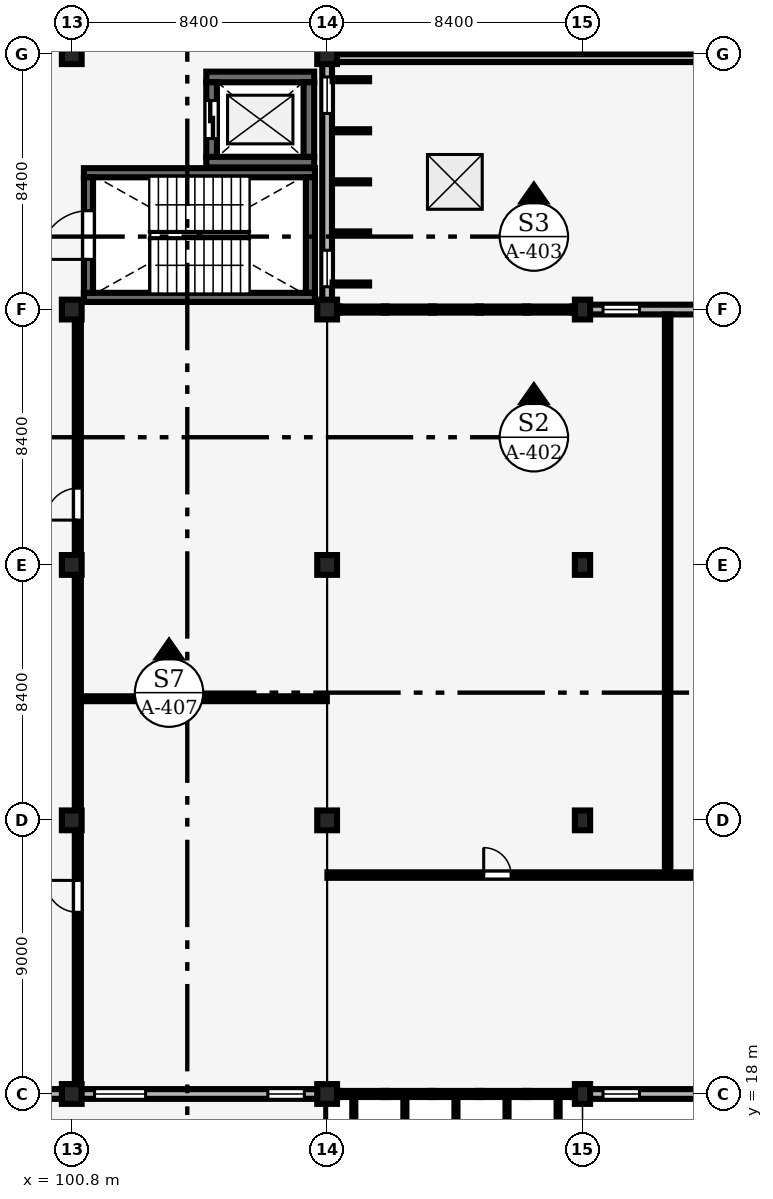
"""IFC4 building model, lengths in metres.
Left out: names, types, materials, properties, quantities, classifications, styles, units other than length and angle.
Written with IfcOpenShell. Run it as: python <this file> out.ifc"""

import sys

from ifc_helpers import new_model, si_unit, direction, frame, frame_2d, origin, origin_2d, place, context, subcontext, project, spatial, rectangle, extrude, element, fill, save


model = new_model("IFC4")
c1 = context("Model", 3, precision=1e-05, world=origin(), true_north=direction((0.0, 1.0)))
c2 = subcontext(c1, "Body", "Model", "MODEL_VIEW")
j1 = project(units=[si_unit("LENGTHUNIT", "METRE"), si_unit("PLANEANGLEUNIT", "RADIAN")], contexts=[c1])
p1 = place(None, origin())
s1 = spatial("IfcSite", under=j1, at=p1, CompositionType="ELEMENT")
p2 = place(p1, origin())
s2 = spatial("IfcBuilding", under=s1, at=p2, CompositionType="ELEMENT")
p3 = place(p2, frame((0.0, 0.0, 4.8)))
s3 = spatial("IfcBuildingStorey", under=s2, at=p3, CompositionType="ELEMENT", Elevation=4.8)
for number, where, z_axis, x_axis in (
    (1, (100.8, 18.0, 0.0), (0.0, 0.0, 1.0), (1.0, 0.0, 0.0)),
    (2, (100.8, 27.0, 0.0), (0.0, 0.0, 1.0), (1.0, 0.0, 0.0)),
    (3, (100.8, 35.4, 0.0), (0.0, 0.0, 1.0), (1.0, 0.0, 0.0)),
    (4, (100.8, 43.8, 0.0), (0.0, 0.0, 1.0), (1.0, 0.0, 0.0)),
    (5, (100.8, 52.2, 0.0), (0.0, 0.0, 1.0), (1.0, 0.0, 0.0)),
    (6, (109.2, 18.0, 0.0), (0.0, 0.0, 1.0), (1.0, 0.0, 0.0)),
    (7, (109.2, 27.0, 0.0), (0.0, 0.0, 1.0), (1.0, 0.0, 0.0)),
    (8, (109.2, 35.4, 0.0), (0.0, 0.0, 1.0), (1.0, 0.0, 0.0)),
    (9, (109.2, 43.8, 0.0), (0.0, 0.0, 1.0), (1.0, 0.0, 0.0)),
    (10, (109.2, 52.2, 0.0), (0.0, 0.0, 1.0), (1.0, 0.0, 0.0)),
):
    element("IfcColumn", number, at=place(p3, frame(where, z_axis=z_axis, x_axis=x_axis)), inside=s3, PredefinedType="COLUMN", context=c2, shape_type="SweptSolid", body=[
        extrude(rectangle(XDim=0.65, YDim=0.65, at=origin_2d()), origin(), (0.0, 0.0, 1.0), 4.2),
    ])
for number, where, z_axis, x_axis in (
    (11, (117.6, 18.0, 0.0), (0.0, 0.0, 1.0), (1.0, 0.0, 0.0)),
    (12, (117.6, 27.0, 0.0), (0.0, 0.0, 1.0), (1.0, 0.0, 0.0)),
    (13, (117.6, 35.4, 0.0), (0.0, 0.0, 1.0), (1.0, 0.0, 0.0)),
    (14, (117.6, 43.8, 0.0), (0.0, 0.0, 1.0), (1.0, 0.0, 0.0)),
):
    element("IfcColumn", number, at=place(p3, frame(where, z_axis=z_axis, x_axis=x_axis)), inside=s3, PredefinedType="COLUMN", context=c2, shape_type="SweptSolid", body=[
        extrude(rectangle(XDim=0.5, YDim=0.65, at=origin_2d()), origin(), (0.0, 0.0, 1.0), 4.2),
    ])
p4 = place(p3, frame((92.7, 18.0, 0.0), z_axis=(0.0, 0.0, 1.0), x_axis=(1.0, 0.0, 0.0)))
e15 = element("IfcWall", 15, at=p4, inside=s3, PredefinedType="SOLIDWALL", context=c2, shape_type="SweptSolid", body=[
    extrude(rectangle(XDim=7.8, YDim=0.32, at=frame_2d((3.9, 0.0))), origin(), (0.0, 0.0, 1.0), 3.15),
])
p5 = place(p4, frame((4.8, 0.0, 0.0), z_axis=(0.0, 0.0, 1.0), x_axis=(-1.0, 0.0, 0.0)))
e16 = element("IfcOpeningElement", 16, at=p5, cuts=e15, PredefinedType="OPENING", context=c2, shape_type="SweptSolid", body=[
    extrude(rectangle(XDim=1.8, YDim=2.3, at=frame_2d((0.9, 1.15))), frame((0.0, 0.17, 0.0), z_axis=(0.0, -1.0, 0.0), x_axis=(1.0, 0.0, 0.0)), (0.0, 0.0, 1.0), 0.34),
])
p6 = place(p4, frame((0.45, 0.0, 0.95)))
e17 = element("IfcOpeningElement", 17, at=p6, cuts=e15, PredefinedType="OPENING", context=c2, shape_type="SweptSolid", body=[
    extrude(rectangle(XDim=1.68, YDim=1.8, at=frame_2d((0.84, 0.9))), frame((0.0, 0.17, 0.0), z_axis=(0.0, -1.0, 0.0), x_axis=(1.0, 0.0, 0.0)), (0.0, 0.0, 1.0), 0.34),
])
p7 = place(p3, frame((101.1, 18.0, 0.0), z_axis=(0.0, 0.0, 1.0), x_axis=(1.0, 0.0, 0.0)))
e18 = element("IfcWall", 18, at=p7, inside=s3, PredefinedType="SOLIDWALL", context=c2, shape_type="SweptSolid", body=[
    extrude(rectangle(XDim=7.8, YDim=0.32, at=frame_2d((3.9, 0.0))), origin(), (0.0, 0.0, 1.0), 3.1),
])
p8 = place(p7, frame((0.45, 0.0, 0.9)))
e19 = element("IfcOpeningElement", 19, at=p8, cuts=e18, PredefinedType="OPENING", context=c2, shape_type="SweptSolid", body=[
    extrude(rectangle(XDim=1.68, YDim=2.05, at=frame_2d((0.84, 1.025))), frame((0.0, 0.17, 0.0), z_axis=(0.0, -1.0, 0.0), x_axis=(1.0, 0.0, 0.0)), (0.0, 0.0, 1.0), 0.34),
])
p9 = place(p7, frame((6.15, 0.0, 0.9)))
e20 = element("IfcOpeningElement", 20, at=p9, cuts=e18, PredefinedType="OPENING", context=c2, shape_type="SweptSolid", body=[
    extrude(rectangle(XDim=1.2, YDim=1.5, at=frame_2d((0.6, 0.75))), frame((0.0, 0.17, 0.0), z_axis=(0.0, -1.0, 0.0), x_axis=(1.0, 0.0, 0.0)), (0.0, 0.0, 1.0), 0.34),
])
p10 = place(p3, frame((117.825, 18.0, 0.0), z_axis=(0.0, 0.0, 1.0), x_axis=(1.0, 0.0, 0.0)))
e21 = element("IfcWall", 21, at=p10, inside=s3, PredefinedType="SOLIDWALL", context=c2, shape_type="SweptSolid", body=[
    extrude(rectangle(XDim=7.95, YDim=0.32, at=frame_2d((3.975, 0.0))), origin(), (0.0, 0.0, 1.0), 3.14),
])
p11 = place(p10, frame((0.45, 0.0, 0.9)))
e22 = element("IfcOpeningElement", 22, at=p11, cuts=e21, PredefinedType="OPENING", context=c2, shape_type="SweptSolid", body=[
    extrude(rectangle(XDim=1.2, YDim=1.8, at=frame_2d((0.6, 0.9))), frame((0.0, 0.17, 0.0), z_axis=(0.0, -1.0, 0.0), x_axis=(1.0, 0.0, 0.0)), (0.0, 0.0, 1.0), 0.34),
])
p12 = place(p10, frame((6.02, 0.0, 0.9)))
e23 = element("IfcOpeningElement", 23, at=p12, cuts=e21, PredefinedType="OPENING", context=c2, shape_type="SweptSolid", body=[
    extrude(rectangle(XDim=1.68, YDim=2.09, at=frame_2d((0.84, 1.045))), frame((0.0, 0.17, 0.0), z_axis=(0.0, -1.0, 0.0), x_axis=(1.0, 0.0, 0.0)), (0.0, 0.0, 1.0), 0.34),
])
p13 = place(p3, frame((117.825, 43.8, 0.0), z_axis=(0.0, 0.0, 1.0), x_axis=(1.0, 0.0, 0.0)))
e24 = element("IfcWall", 24, at=p13, inside=s3, PredefinedType="SOLIDWALL", context=c2, shape_type="SweptSolid", body=[
    extrude(rectangle(XDim=7.95, YDim=0.32, at=frame_2d((3.975, 0.0))), origin(), (0.0, 0.0, 1.0), 3.08),
])
p14 = place(p13, frame((0.45, 0.0, 0.9)))
e25 = element("IfcOpeningElement", 25, at=p14, cuts=e24, PredefinedType="OPENING", context=c2, shape_type="SweptSolid", body=[
    extrude(rectangle(XDim=1.2, YDim=1.8, at=frame_2d((0.6, 0.9))), frame((0.0, 0.17, 0.0), z_axis=(0.0, -1.0, 0.0), x_axis=(1.0, 0.0, 0.0)), (0.0, 0.0, 1.0), 0.34),
])
p15 = place(p13, frame((6.02, 0.0, 0.9)))
e26 = element("IfcOpeningElement", 26, at=p15, cuts=e24, PredefinedType="OPENING", context=c2, shape_type="SweptSolid", body=[
    extrude(rectangle(XDim=1.68, YDim=2.03, at=frame_2d((0.84, 1.015))), frame((0.0, 0.17, 0.0), z_axis=(0.0, -1.0, 0.0), x_axis=(1.0, 0.0, 0.0)), (0.0, 0.0, 1.0), 0.34),
])
p16 = place(p3, frame((109.2, 44.1, 0.0), z_axis=(0.0, 0.0, 1.0), x_axis=(0.0, 1.0, 0.0)))
e27 = element("IfcWall", 27, at=p16, inside=s3, PredefinedType="SOLIDWALL", context=c2, shape_type="SweptSolid", body=[
    extrude(rectangle(XDim=7.8, YDim=0.32, at=frame_2d((3.9, 0.0))), origin(), (0.0, 0.0, 1.0), 3.3),
])
p17 = place(p16, frame((0.45, 0.0, 0.85)))
e28 = element("IfcOpeningElement", 28, at=p17, cuts=e27, PredefinedType="OPENING", context=c2, shape_type="SweptSolid", body=[
    extrude(rectangle(XDim=1.2, YDim=1.8, at=frame_2d((0.6, 0.9))), frame((0.0, 0.17, 0.0), z_axis=(0.0, -1.0, 0.0), x_axis=(1.0, 0.0, 0.0)), (0.0, 0.0, 1.0), 0.34),
])
p18 = place(p16, frame((6.15, 0.0, 0.85)))
e29 = element("IfcOpeningElement", 29, at=p18, cuts=e27, PredefinedType="OPENING", context=c2, shape_type="SweptSolid", body=[
    extrude(rectangle(XDim=1.2, YDim=1.8, at=frame_2d((0.6, 0.9))), frame((0.0, 0.17, 0.0), z_axis=(0.0, -1.0, 0.0), x_axis=(1.0, 0.0, 0.0)), (0.0, 0.0, 1.0), 0.34),
])
p19 = place(p3, frame((109.33, 52.07, 0.0), z_axis=(0.0, 0.0, 1.0), x_axis=(1.0, 0.0, 0.0)))
e30 = element("IfcWall", 30, at=p19, inside=s3, PredefinedType="PARAPET", context=c2, shape_type="SweptSolid", body=[
    extrude(rectangle(XDim=33.34, YDim=0.26, at=frame_2d((16.67, 0.0))), origin(), (0.0, 0.0, 1.0), 0.85),
])
for number, where, z_axis, x_axis in (
    (31, (101.2, 44.2, 0.0), (0.0, 0.0, 1.0), (1.0, 0.0, 0.0)),
    (32, (101.2, 48.3, 0.0), (0.0, 0.0, 1.0), (1.0, 0.0, 0.0)),
):
    element("IfcWall", number, at=place(p3, frame(where, z_axis=z_axis, x_axis=x_axis)), inside=s3, PredefinedType="SHEAR", context=c2, shape_type="SweptSolid", body=[
        extrude(rectangle(XDim=7.6, YDim=0.3, at=frame_2d((3.8, 0.0))), origin(), (0.0, 0.0, 1.0), 4.025),
    ])
p20 = place(p3, frame((101.35, 44.35, 0.0), z_axis=(0.0, 0.0, 1.0), x_axis=(0.0, 1.0, 0.0)))
e33 = element("IfcWall", 33, at=p20, inside=s3, PredefinedType="SHEAR", context=c2, shape_type="SweptSolid", body=[
    extrude(rectangle(XDim=3.8, YDim=0.3, at=frame_2d((1.9, 0.0))), origin(), (0.0, 0.0, 1.0), 4.025),
])
p21 = place(p20, frame((1.1, 0.0, 0.0)))
e34 = element("IfcOpeningElement", 34, at=p21, cuts=e33, PredefinedType="OPENING", context=c2, shape_type="SweptSolid", body=[
    extrude(rectangle(XDim=1.6, YDim=2.2, at=frame_2d((0.8, 1.1))), frame((0.0, 0.16, 0.0), z_axis=(0.0, -1.0, 0.0), x_axis=(1.0, 0.0, 0.0)), (0.0, 0.0, 1.0), 0.32),
])
p22 = place(p3, frame((108.65, 44.35, 0.0), z_axis=(0.0, 0.0, 1.0), x_axis=(0.0, 1.0, 0.0)))
e35 = element("IfcWall", 35, at=p22, inside=s3, PredefinedType="SHEAR", context=c2, shape_type="SweptSolid", body=[
    extrude(rectangle(XDim=3.8, YDim=0.3, at=frame_2d((1.9, 0.0))), origin(), (0.0, 0.0, 1.0), 4.025),
])
for number, where, z_axis, x_axis in (
    (36, (105.225, 48.65, 0.0), (0.0, 0.0, 1.0), (1.0, 0.0, 0.0)),
    (37, (105.225, 51.45, 0.0), (0.0, 0.0, 1.0), (1.0, 0.0, 0.0)),
):
    element("IfcWall", number, at=place(p3, frame(where, z_axis=z_axis, x_axis=x_axis)), inside=s3, PredefinedType="SHEAR", context=c2, shape_type="SweptSolid", body=[
        extrude(rectangle(XDim=3.55, YDim=0.35, at=frame_2d((1.775, 0.0))), origin(), (0.0, 0.0, 1.0), 3.92),
    ])
p23 = place(p3, frame((105.4, 48.825, 0.0), z_axis=(0.0, 0.0, 1.0), x_axis=(0.0, 1.0, 0.0)))
e38 = element("IfcWall", 38, at=p23, inside=s3, PredefinedType="SHEAR", context=c2, shape_type="SweptSolid", body=[
    extrude(rectangle(XDim=2.45, YDim=0.35, at=frame_2d((1.225, 0.0))), origin(), (0.0, 0.0, 1.0), 3.92),
])
p24 = place(p23, frame((0.6, 0.0, 0.0)))
e39 = element("IfcOpeningElement", 39, at=p24, cuts=e38, PredefinedType="OPENING", context=c2, shape_type="SweptSolid", body=[
    extrude(rectangle(XDim=1.25, YDim=2.25, at=frame_2d((0.625, 1.125))), frame((0.0, 0.185, 0.0), z_axis=(0.0, -1.0, 0.0), x_axis=(1.0, 0.0, 0.0)), (0.0, 0.0, 1.0), 0.37),
])
p25 = place(p3, frame((108.6, 48.825, 0.0), z_axis=(0.0, 0.0, 1.0), x_axis=(0.0, 1.0, 0.0)))
e40 = element("IfcWall", 40, at=p25, inside=s3, PredefinedType="SHEAR", context=c2, shape_type="SweptSolid", body=[
    extrude(rectangle(XDim=2.45, YDim=0.35, at=frame_2d((1.225, 0.0))), origin(), (0.0, 0.0, 1.0), 3.92),
])
p26 = place(p3, frame((101.105, 31.0, 0.0), z_axis=(0.0, 0.0, 1.0), x_axis=(1.0, 0.0, 0.0)))
e41 = element("IfcWall", 41, at=p26, inside=s3, PredefinedType="PARTITIONING", context=c2, shape_type="SweptSolid", body=[
    extrude(rectangle(XDim=8.085, YDim=0.16, at=frame_2d((4.042, 0.0))), origin(), (0.0, 0.0, 1.0), 3.9),
])
p27 = place(p3, frame((101.0, 18.165, 0.0), z_axis=(0.0, 0.0, 1.0), x_axis=(0.0, 1.0, 0.0)))
e42 = element("IfcWall", 42, at=p27, inside=s3, PredefinedType="PARTITIONING", context=c2, shape_type="SweptSolid", body=[
    extrude(rectangle(XDim=8.5, YDim=0.2, at=frame_2d((4.25, 0.0))), origin(), (0.0, 0.0, 1.0), 3.2),
])
p28 = place(p27, frame((5.81, 0.0, 0.0)))
e43 = element("IfcOpeningElement", 43, at=p28, cuts=e42, PredefinedType="OPENING", context=c2, shape_type="SweptSolid", body=[
    extrude(rectangle(XDim=1.05, YDim=2.2, at=frame_2d((0.525, 1.1))), frame((0.0, 0.11, 0.0), z_axis=(0.0, -1.0, 0.0), x_axis=(1.0, 0.0, 0.0)), (0.0, 0.0, 1.0), 0.22),
])
p29 = place(p3, frame((101.0, 27.335, 0.0), z_axis=(0.0, 0.0, 1.0), x_axis=(0.0, 1.0, 0.0)))
e44 = element("IfcWall", 44, at=p29, inside=s3, PredefinedType="PARTITIONING", context=c2, shape_type="SweptSolid", body=[
    extrude(rectangle(XDim=7.73, YDim=0.2, at=frame_2d((3.865, 0.0))), origin(), (0.0, 0.0, 1.0), 3.15),
])
p30 = place(p3, frame((101.0, 35.735, 0.0), z_axis=(0.0, 0.0, 1.0), x_axis=(0.0, 1.0, 0.0)))
e45 = element("IfcWall", 45, at=p30, inside=s3, PredefinedType="PARTITIONING", context=c2, shape_type="SweptSolid", body=[
    extrude(rectangle(XDim=7.73, YDim=0.2, at=frame_2d((3.865, 0.0))), origin(), (0.0, 0.0, 1.0), 3.1),
])
p31 = place(p30, frame((1.14, 0.0, 0.0)))
e46 = element("IfcOpeningElement", 46, at=p31, cuts=e45, PredefinedType="OPENING", context=c2, shape_type="SweptSolid", body=[
    extrude(rectangle(XDim=1.05, YDim=2.2, at=frame_2d((0.525, 1.1))), frame((0.0, 0.11, 0.0), z_axis=(0.0, -1.0, 0.0), x_axis=(1.0, 0.0, 0.0)), (0.0, 0.0, 1.0), 0.22),
])
p32 = place(p3, frame((120.4, 25.295, 0.0), z_axis=(0.0, 0.0, 1.0), x_axis=(0.0, 1.0, 0.0)))
e47 = element("IfcWall", 47, at=p32, inside=s3, PredefinedType="PARTITIONING", context=c2, shape_type="SweptSolid", body=[
    extrude(rectangle(XDim=18.34, YDim=0.18, at=frame_2d((9.17, 0.0))), origin(), (0.0, 0.0, 1.0), 3.9),
])
p33 = place(p3, frame((109.21, 25.2, 0.0), z_axis=(0.0, 0.0, 1.0), x_axis=(1.0, 0.0, 0.0)))
e48 = element("IfcWall", 48, at=p33, inside=s3, PredefinedType="PARTITIONING", context=c2, shape_type="SweptSolid", body=[
    extrude(rectangle(XDim=33.58, YDim=0.18, at=frame_2d((16.79, 0.0))), origin(), (0.0, 0.0, 1.0), 3.9),
])
p34 = place(p33, frame((5.14, 0.0, 0.0)))
e49 = element("IfcOpeningElement", 49, at=p34, cuts=e48, PredefinedType="OPENING", context=c2, shape_type="SweptSolid", body=[
    extrude(rectangle(XDim=0.9, YDim=2.1, at=frame_2d((0.45, 1.05))), frame((0.0, 0.1, 0.0), z_axis=(0.0, -1.0, 0.0), x_axis=(1.0, 0.0, 0.0)), (0.0, 0.0, 1.0), 0.2),
])
p35 = place(p33, frame((16.34, 0.0, 0.0)))
e50 = element("IfcOpeningElement", 50, at=p35, cuts=e48, PredefinedType="OPENING", context=c2, shape_type="SweptSolid", body=[
    extrude(rectangle(XDim=0.9, YDim=2.1, at=frame_2d((0.45, 1.05))), frame((0.0, 0.1, 0.0), z_axis=(0.0, -1.0, 0.0), x_axis=(1.0, 0.0, 0.0)), (0.0, 0.0, 1.0), 0.2),
])
p36 = place(p33, frame((27.54, 0.0, 0.0)))
e51 = element("IfcOpeningElement", 51, at=p36, cuts=e48, PredefinedType="OPENING", context=c2, shape_type="SweptSolid", body=[
    extrude(rectangle(XDim=0.9, YDim=2.1, at=frame_2d((0.45, 1.05))), frame((0.0, 0.1, 0.0), z_axis=(0.0, -1.0, 0.0), x_axis=(1.0, 0.0, 0.0)), (0.0, 0.0, 1.0), 0.2),
])
p37 = place(p8, origin())
e52 = element("IfcWindow", 52, at=p37, inside=s3, PartitioningType="SINGLE_PANEL", PredefinedType="WINDOW", context=c2, shape_type="SweptSolid", body=[
    extrude(rectangle(XDim=1.68, YDim=2.05, at=frame_2d((0.84, 1.025))), frame((0.0, 0.03, 0.0), z_axis=(0.0, -1.0, 0.0), x_axis=(1.0, 0.0, 0.0)), (0.0, 0.0, 1.0), 0.06),
])
fill(e19, e52)
p38 = place(p9, origin())
e53 = element("IfcWindow", 53, at=p38, inside=s3, PartitioningType="SINGLE_PANEL", PredefinedType="WINDOW", context=c2, shape_type="SweptSolid", body=[
    extrude(rectangle(XDim=1.2, YDim=1.5, at=frame_2d((0.6, 0.75))), frame((0.0, 0.03, 0.0), z_axis=(0.0, -1.0, 0.0), x_axis=(1.0, 0.0, 0.0)), (0.0, 0.0, 1.0), 0.06),
])
fill(e20, e53)
p39 = place(p11, origin())
e54 = element("IfcWindow", 54, at=p39, inside=s3, PartitioningType="SINGLE_PANEL", PredefinedType="WINDOW", context=c2, shape_type="SweptSolid", body=[
    extrude(rectangle(XDim=1.2, YDim=1.8, at=frame_2d((0.6, 0.9))), frame((0.0, 0.03, 0.0), z_axis=(0.0, -1.0, 0.0), x_axis=(1.0, 0.0, 0.0)), (0.0, 0.0, 1.0), 0.06),
])
fill(e22, e54)
p40 = place(p14, origin())
e55 = element("IfcWindow", 55, at=p40, inside=s3, PartitioningType="SINGLE_PANEL", PredefinedType="WINDOW", context=c2, shape_type="SweptSolid", body=[
    extrude(rectangle(XDim=1.2, YDim=1.8, at=frame_2d((0.6, 0.9))), frame((0.0, 0.03, 0.0), z_axis=(0.0, -1.0, 0.0), x_axis=(1.0, 0.0, 0.0)), (0.0, 0.0, 1.0), 0.06),
])
fill(e25, e55)
p41 = place(p17, origin())
e56 = element("IfcWindow", 56, at=p41, inside=s3, PartitioningType="SINGLE_PANEL", PredefinedType="WINDOW", context=c2, shape_type="SweptSolid", body=[
    extrude(rectangle(XDim=1.2, YDim=1.8, at=frame_2d((0.6, 0.9))), frame((0.0, 0.03, 0.0), z_axis=(0.0, -1.0, 0.0), x_axis=(1.0, 0.0, 0.0)), (0.0, 0.0, 1.0), 0.06),
])
fill(e28, e56)
p42 = place(p18, origin())
e57 = element("IfcWindow", 57, at=p42, inside=s3, PartitioningType="SINGLE_PANEL", PredefinedType="WINDOW", context=c2, shape_type="SweptSolid", body=[
    extrude(rectangle(XDim=1.2, YDim=1.8, at=frame_2d((0.6, 0.9))), frame((0.0, 0.03, 0.0), z_axis=(0.0, -1.0, 0.0), x_axis=(1.0, 0.0, 0.0)), (0.0, 0.0, 1.0), 0.06),
])
fill(e29, e57)
p43 = place(p3, frame((0.0, 0.0, -0.22)))
p44 = place(p43, frame((113.4, 48.0, -0.01)))
p45 = place(p44, frame((0.0, 0.0, 0.18)))
e58 = element("IfcWindow", 58, at=p45, inside=s3, PartitioningType="SINGLE_PANEL", PredefinedType="SKYLIGHT", context=c2, shape_type="SweptSolid", body=[
    extrude(rectangle(XDim=1.8, YDim=1.8, at=origin_2d()), origin(), (0.0, 0.0, 1.0), 0.05),
])
p46 = place(p21, origin())
e59 = element("IfcDoor", 59, at=p46, inside=s3, OperationType="DOUBLE_DOOR_SINGLE_SWING", PredefinedType="DOOR", context=c2, shape_type="SweptSolid", body=[
    extrude(rectangle(XDim=1.6, YDim=2.2, at=frame_2d((0.8, 1.1))), frame((0.0, 0.025, 0.0), z_axis=(0.0, -1.0, 0.0), x_axis=(1.0, 0.0, 0.0)), (0.0, 0.0, 1.0), 0.05),
])
fill(e34, e59)
p47 = place(p24, origin())
e60 = element("IfcDoor", 60, at=p47, inside=s3, OperationType="DOUBLE_DOOR_SLIDING", PredefinedType="DOOR", context=c2, shape_type="SweptSolid", body=[
    extrude(rectangle(XDim=1.25, YDim=2.25, at=frame_2d((0.625, 1.125))), frame((0.0, 0.025, 0.0), z_axis=(0.0, -1.0, 0.0), x_axis=(1.0, 0.0, 0.0)), (0.0, 0.0, 1.0), 0.05),
])
fill(e39, e60)
p48 = place(p28, origin())
e61 = element("IfcDoor", 61, at=p48, inside=s3, OperationType="SINGLE_SWING_RIGHT", PredefinedType="DOOR", context=c2, shape_type="SweptSolid", body=[
    extrude(rectangle(XDim=1.05, YDim=2.2, at=frame_2d((0.525, 1.1))), frame((0.0, 0.025, 0.0), z_axis=(0.0, -1.0, 0.0), x_axis=(1.0, 0.0, 0.0)), (0.0, 0.0, 1.0), 0.05),
])
fill(e43, e61)
p49 = place(p31, origin())
e62 = element("IfcDoor", 62, at=p49, inside=s3, OperationType="SINGLE_SWING_LEFT", PredefinedType="DOOR", context=c2, shape_type="SweptSolid", body=[
    extrude(rectangle(XDim=1.05, YDim=2.2, at=frame_2d((0.525, 1.1))), frame((0.0, 0.025, 0.0), z_axis=(0.0, -1.0, 0.0), x_axis=(1.0, 0.0, 0.0)), (0.0, 0.0, 1.0), 0.05),
])
fill(e46, e62)
p50 = place(p34, origin())
e63 = element("IfcDoor", 63, at=p50, inside=s3, OperationType="SINGLE_SWING_LEFT", PredefinedType="DOOR", context=c2, shape_type="SweptSolid", body=[
    extrude(rectangle(XDim=0.9, YDim=2.1, at=frame_2d((0.45, 1.05))), frame((0.0, 0.025, 0.0), z_axis=(0.0, -1.0, 0.0), x_axis=(1.0, 0.0, 0.0)), (0.0, 0.0, 1.0), 0.05),
])
fill(e49, e63)
save(model, sys.argv[1])
